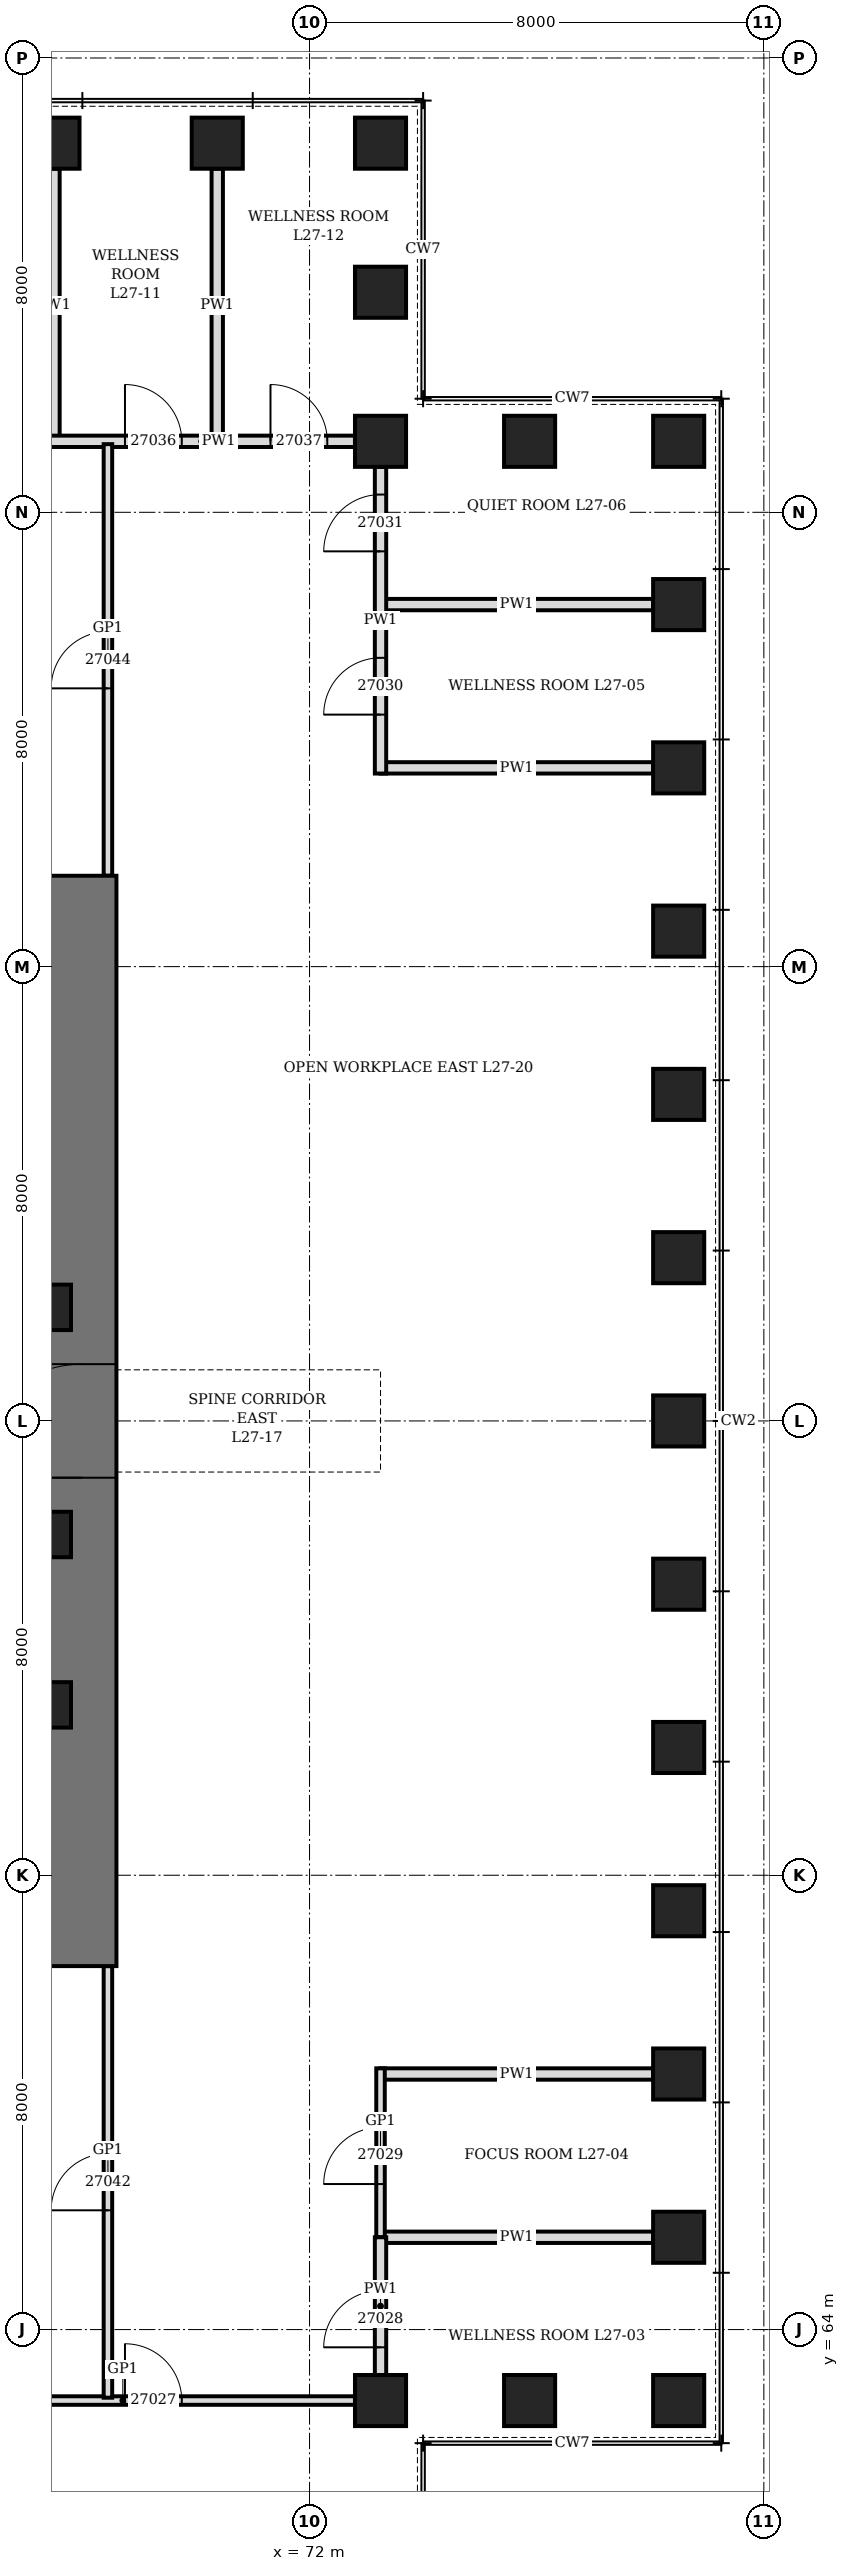
"""IFC4 building model, lengths in metres.
Left out: names, types, materials, properties, quantities, classifications, styles, units other than length and angle.
Written with IfcOpenShell. Run it as: python <this file> out.ifc"""

import sys

from ifc_helpers import new_model, si_unit, direction, frame, frame_2d, origin, origin_2d, place, context, subcontext, project, spatial, rectangle, hollow_rectangle, extrude, element, fill, save


model = new_model("IFC4")
c1 = context("Model", 3, precision=1e-05, world=origin(), true_north=direction((0.0, 1.0)))
c2 = subcontext(c1, "Body", "Model", "MODEL_VIEW")
j1 = project(units=[si_unit("LENGTHUNIT", "METRE"), si_unit("PLANEANGLEUNIT", "RADIAN")], contexts=[c1])
p1 = place(None, origin())
s1 = spatial("IfcSite", under=j1, at=p1, CompositionType="ELEMENT")
p2 = place(p1, origin())
s2 = spatial("IfcBuilding", under=s1, at=p2, CompositionType="ELEMENT")
p3 = place(p2, frame((0.0, 0.0, 124.9)))
s3 = spatial("IfcBuildingStorey", under=s2, at=p3, CompositionType="ELEMENT", Elevation=124.9)
for number, where, z_axis, x_axis in (
    (1, (73.25, 62.75, 0.0), (0.0, 0.0, 1.0), (1.0, 0.0, 0.0)),
    (2, (75.875, 62.75, 0.0), (0.0, 0.0, 1.0), (1.0, 0.0, 0.0)),
    (3, (78.5, 62.75, 0.0), (0.0, 0.0, 1.0), (0.0, 1.0, 0.0)),
    (4, (78.5, 65.625, 0.0), (0.0, 0.0, 1.0), (0.0, 1.0, 0.0)),
    (5, (78.5, 68.5, 0.0), (0.0, 0.0, 1.0), (0.0, 1.0, 0.0)),
    (6, (78.5, 71.375, 0.0), (0.0, 0.0, 1.0), (0.0, 1.0, 0.0)),
    (7, (78.5, 74.25, 0.0), (0.0, 0.0, 1.0), (0.0, 1.0, 0.0)),
    (8, (78.5, 77.125, 0.0), (0.0, 0.0, 1.0), (0.0, 1.0, 0.0)),
    (9, (78.5, 80.0, 0.0), (0.0, 0.0, 1.0), (0.0, 1.0, 0.0)),
    (10, (78.5, 82.875, 0.0), (0.0, 0.0, 1.0), (0.0, 1.0, 0.0)),
    (11, (78.5, 85.75, 0.0), (0.0, 0.0, 1.0), (0.0, 1.0, 0.0)),
    (12, (78.5, 88.625, 0.0), (0.0, 0.0, 1.0), (0.0, 1.0, 0.0)),
    (13, (78.5, 91.5, 0.0), (0.0, 0.0, 1.0), (0.0, 1.0, 0.0)),
    (14, (78.5, 94.375, 0.0), (0.0, 0.0, 1.0), (0.0, 1.0, 0.0)),
    (15, (78.5, 97.25, 0.0), (0.0, 0.0, 1.0), (1.0, 0.0, 0.0)),
    (16, (75.875, 97.25, 0.0), (0.0, 0.0, 1.0), (1.0, 0.0, 0.0)),
    (17, (73.25, 97.25, 0.0), (0.0, 0.0, 1.0), (0.0, 1.0, 0.0)),
    (18, (73.25, 99.875, 0.0), (0.0, 0.0, 1.0), (0.0, 1.0, 0.0)),
    (19, (73.25, 102.5, 0.0), (0.0, 0.0, 1.0), (1.0, 0.0, 0.0)),
    (20, (70.375, 102.5, 0.0), (0.0, 0.0, 1.0), (1.0, 0.0, 0.0)),
    (21, (67.5, 102.5, 0.0), (0.0, 0.0, 1.0), (1.0, 0.0, 0.0)),
):
    element("IfcColumn", number, at=place(p3, frame(where, z_axis=z_axis, x_axis=x_axis)), inside=s3, PredefinedType="COLUMN", context=c2, shape_type="SweptSolid", body=[
        extrude(hollow_rectangle(XDim=0.9, YDim=0.9, WallThickness=0.15, at=origin_2d()), origin(), (0.0, 0.0, 1.0), 4.2),
    ])
p4 = place(p3, frame((68.0, 70.4, 0.0), z_axis=(0.0, 0.0, 1.0), x_axis=(0.0, 1.0, 0.0)))
e22 = element("IfcWall", 22, at=p4, inside=s3, PredefinedType="SHEAR", context=c2, shape_type="SweptSolid", body=[
    extrude(rectangle(XDim=19.2, YDim=1.2, at=frame_2d((9.6, 0.0))), origin(), (0.0, 0.0, 1.0), 4.2),
])
p5 = place(p4, frame((8.6, 0.0, 0.0)))
e23 = element("IfcOpeningElement", 23, at=p5, cuts=e22, PredefinedType="OPENING", context=c2, shape_type="SweptSolid", body=[
    extrude(rectangle(XDim=2.0, YDim=2.4, at=frame_2d((1.0, 1.2))), frame((0.0, 0.61, 0.0), z_axis=(0.0, -1.0, 0.0), x_axis=(1.0, 0.0, 0.0)), (0.0, 0.0, 1.0), 1.22),
])
for number, where, z_axis, x_axis in (
    (24, (67.4, 75.0, 0.0), (0.0, 0.0, 1.0), (1.0, 0.0, 0.0)),
    (25, (67.4, 78.0, 0.0), (0.0, 0.0, 1.0), (1.0, 0.0, 0.0)),
    (26, (67.4, 82.0, 0.0), (0.0, 0.0, 1.0), (1.0, 0.0, 0.0)),
):
    element("IfcColumn", number, at=place(p3, frame(where, z_axis=z_axis, x_axis=x_axis)), inside=s3, PredefinedType="COLUMN", context=c2, shape_type="SweptSolid", body=[
        extrude(hollow_rectangle(XDim=0.8, YDim=0.8, WallThickness=0.1, at=origin_2d()), origin(), (0.0, 0.0, 1.0), 4.2),
    ])
for number, where, z_axis, x_axis in (
    (27, (73.25, 65.625, 0.0), (0.0, 0.0, 1.0), (1.0, 0.0, 0.0)),
    (28, (73.25, 68.5, 0.0), (0.0, 0.0, 1.0), (1.0, 0.0, 0.0)),
    (29, (73.25, 91.5, 0.0), (0.0, 0.0, 1.0), (1.0, 0.0, 0.0)),
    (30, (73.25, 94.375, 0.0), (0.0, 0.0, 1.0), (1.0, 0.0, 0.0)),
):
    element("IfcWall", number, at=place(p3, frame(where, z_axis=z_axis, x_axis=x_axis)), inside=s3, PredefinedType="PARTITIONING", context=c2, shape_type="SweptSolid", body=[
        extrude(rectangle(XDim=4.8, YDim=0.2, at=frame_2d((2.4, 0.0))), origin(), (0.0, 0.0, 1.0), 3.428),
    ])
p6 = place(p3, frame((67.5, 97.25, 0.0), z_axis=(0.0, 0.0, 1.0), x_axis=(0.0, 1.0, 0.0)))
e31 = element("IfcWall", 31, at=p6, inside=s3, PredefinedType="PARTITIONING", context=c2, shape_type="SweptSolid", body=[
    extrude(rectangle(XDim=4.8, YDim=0.2, at=frame_2d((2.4, 0.0))), origin(), (0.0, 0.0, 1.0), 2.74),
])
p7 = place(p3, frame((70.375, 97.25, 0.0), z_axis=(0.0, 0.0, 1.0), x_axis=(0.0, 1.0, 0.0)))
e32 = element("IfcWall", 32, at=p7, inside=s3, PredefinedType="PARTITIONING", context=c2, shape_type="SweptSolid", body=[
    extrude(rectangle(XDim=4.8, YDim=0.2, at=frame_2d((2.4, 0.0))), origin(), (0.0, 0.0, 1.0), 3.428),
])
p8 = place(p3, frame((64.625, 62.75, 0.0), z_axis=(0.0, 0.0, 1.0), x_axis=(1.0, 0.0, 0.0)))
e33 = element("IfcWall", 33, at=p8, inside=s3, PredefinedType="PARTITIONING", context=c2, shape_type="SweptSolid", body=[
    extrude(rectangle(XDim=8.175, YDim=0.15, at=frame_2d((4.087, 0.0))), origin(), (0.0, 0.0, 1.0), 4.04),
])
p9 = place(p8, frame((4.125, 0.0, 0.0)))
e34 = element("IfcOpeningElement", 34, at=p9, cuts=e33, PredefinedType="OPENING", context=c2, shape_type="SweptSolid", body=[
    extrude(rectangle(XDim=1.0, YDim=2.4, at=frame_2d((0.5, 1.2))), frame((0.0, 0.085, 0.0), z_axis=(0.0, -1.0, 0.0), x_axis=(1.0, 0.0, 0.0)), (0.0, 0.0, 1.0), 0.17),
])
p10 = place(p3, frame((67.4, 97.25, 0.0), z_axis=(0.0, 0.0, 1.0), x_axis=(1.0, 0.0, 0.0)))
e35 = element("IfcWall", 35, at=p10, inside=s3, PredefinedType="PARTITIONING", context=c2, shape_type="SweptSolid", body=[
    extrude(rectangle(XDim=5.4, YDim=0.2, at=frame_2d((2.7, 0.0))), origin(), (0.0, 0.0, 1.0), 4.04),
])
p11 = place(p10, frame((1.35, 0.0, 0.0)))
e36 = element("IfcOpeningElement", 36, at=p11, cuts=e35, PredefinedType="OPENING", context=c2, shape_type="SweptSolid", body=[
    extrude(rectangle(XDim=1.0, YDim=2.1, at=frame_2d((0.5, 1.05))), frame((0.0, 0.11, 0.0), z_axis=(0.0, -1.0, 0.0), x_axis=(1.0, 0.0, 0.0)), (0.0, 0.0, 1.0), 0.22),
])
p12 = place(p10, frame((3.913, 0.0, 0.0)))
e37 = element("IfcOpeningElement", 37, at=p12, cuts=e35, PredefinedType="OPENING", context=c2, shape_type="SweptSolid", body=[
    extrude(rectangle(XDim=1.0, YDim=2.1, at=frame_2d((0.5, 1.05))), frame((0.0, 0.11, 0.0), z_axis=(0.0, -1.0, 0.0), x_axis=(1.0, 0.0, 0.0)), (0.0, 0.0, 1.0), 0.22),
])
p13 = place(p3, frame((68.45, 62.8, 0.0), z_axis=(0.0, 0.0, 1.0), x_axis=(0.0, 1.0, 0.0)))
e38 = element("IfcWall", 38, at=p13, inside=s3, PredefinedType="PARTITIONING", context=c2, shape_type="SweptSolid", body=[
    extrude(rectangle(XDim=7.6, YDim=0.15, at=frame_2d((3.8, 0.0))), origin(), (0.0, 0.0, 1.0), 4.04),
])
p14 = place(p13, frame((3.3, 0.0, 0.0)))
e39 = element("IfcOpeningElement", 39, at=p14, cuts=e38, PredefinedType="OPENING", context=c2, shape_type="SweptSolid", body=[
    extrude(rectangle(XDim=1.0, YDim=2.4, at=frame_2d((0.5, 1.2))), frame((0.0, 0.085, 0.0), z_axis=(0.0, -1.0, 0.0), x_axis=(1.0, 0.0, 0.0)), (0.0, 0.0, 1.0), 0.17),
])
p15 = place(p3, frame((68.45, 89.6, 0.0), z_axis=(0.0, 0.0, 1.0), x_axis=(0.0, 1.0, 0.0)))
e40 = element("IfcWall", 40, at=p15, inside=s3, PredefinedType="PARTITIONING", context=c2, shape_type="SweptSolid", body=[
    extrude(rectangle(XDim=7.6, YDim=0.15, at=frame_2d((3.8, 0.0))), origin(), (0.0, 0.0, 1.0), 4.04),
])
p16 = place(p15, frame((3.3, 0.0, 0.0)))
e41 = element("IfcOpeningElement", 41, at=p16, cuts=e40, PredefinedType="OPENING", context=c2, shape_type="SweptSolid", body=[
    extrude(rectangle(XDim=1.0, YDim=2.4, at=frame_2d((0.5, 1.2))), frame((0.0, 0.085, 0.0), z_axis=(0.0, -1.0, 0.0), x_axis=(1.0, 0.0, 0.0)), (0.0, 0.0, 1.0), 0.17),
])
p17 = place(p3, frame((73.25, 65.625, 0.0), z_axis=(0.0, 0.0, 1.0), x_axis=(0.0, 1.0, 0.0)))
e42 = element("IfcWall", 42, at=p17, inside=s3, PredefinedType="PARTITIONING", context=c2, shape_type="SweptSolid", body=[
    extrude(rectangle(XDim=2.975, YDim=0.15, at=frame_2d((1.488, 0.0))), origin(), (0.0, 0.0, 1.0), 4.04),
])
p18 = place(p17, frame((0.938, 0.0, 0.0)))
e43 = element("IfcOpeningElement", 43, at=p18, cuts=e42, PredefinedType="OPENING", context=c2, shape_type="SweptSolid", body=[
    extrude(rectangle(XDim=1.0, YDim=2.4, at=frame_2d((0.5, 1.2))), frame((0.0, 0.085, 0.0), z_axis=(0.0, -1.0, 0.0), x_axis=(1.0, 0.0, 0.0)), (0.0, 0.0, 1.0), 0.17),
])
p19 = place(p3, frame((73.25, 63.2, 0.0), z_axis=(0.0, 0.0, 1.0), x_axis=(0.0, 1.0, 0.0)))
e44 = element("IfcWall", 44, at=p19, inside=s3, PredefinedType="PARTITIONING", context=c2, shape_type="SweptSolid", body=[
    extrude(rectangle(XDim=2.425, YDim=0.2, at=frame_2d((1.212, 0.0))), origin(), (0.0, 0.0, 1.0), 4.04),
])
p20 = place(p19, frame((0.488, 0.0, 0.0)))
e45 = element("IfcOpeningElement", 45, at=p20, cuts=e44, PredefinedType="OPENING", context=c2, shape_type="SweptSolid", body=[
    extrude(rectangle(XDim=1.0, YDim=2.1, at=frame_2d((0.5, 1.05))), frame((0.0, 0.11, 0.0), z_axis=(0.0, -1.0, 0.0), x_axis=(1.0, 0.0, 0.0)), (0.0, 0.0, 1.0), 0.22),
])
p21 = place(p3, frame((73.25, 91.4, 0.0), z_axis=(0.0, 0.0, 1.0), x_axis=(0.0, 1.0, 0.0)))
e46 = element("IfcWall", 46, at=p21, inside=s3, PredefinedType="PARTITIONING", context=c2, shape_type="SweptSolid", body=[
    extrude(rectangle(XDim=5.4, YDim=0.2, at=frame_2d((2.7, 0.0))), origin(), (0.0, 0.0, 1.0), 4.04),
])
p22 = place(p21, frame((1.038, 0.0, 0.0)))
e47 = element("IfcOpeningElement", 47, at=p22, cuts=e46, PredefinedType="OPENING", context=c2, shape_type="SweptSolid", body=[
    extrude(rectangle(XDim=1.0, YDim=2.1, at=frame_2d((0.5, 1.05))), frame((0.0, 0.11, 0.0), z_axis=(0.0, -1.0, 0.0), x_axis=(1.0, 0.0, 0.0)), (0.0, 0.0, 1.0), 0.22),
])
p23 = place(p21, frame((3.913, 0.0, 0.0)))
e48 = element("IfcOpeningElement", 48, at=p23, cuts=e46, PredefinedType="OPENING", context=c2, shape_type="SweptSolid", body=[
    extrude(rectangle(XDim=1.0, YDim=2.1, at=frame_2d((0.5, 1.05))), frame((0.0, 0.11, 0.0), z_axis=(0.0, -1.0, 0.0), x_axis=(1.0, 0.0, 0.0)), (0.0, 0.0, 1.0), 0.22),
])
p24 = place(p5, origin())
e49 = element("IfcDoor", 49, at=p24, inside=s3, OperationType="DOUBLE_DOOR_SINGLE_SWING", PredefinedType="DOOR", context=c2, shape_type="SweptSolid", body=[
    extrude(rectangle(XDim=2.0, YDim=2.4, at=frame_2d((1.0, 1.2))), frame((0.0, 0.35, 0.0), z_axis=(0.0, -1.0, 0.0), x_axis=(1.0, 0.0, 0.0)), (0.0, 0.0, 1.0), 0.7),
])
fill(e23, e49)
p25 = place(p9, origin())
e50 = element("IfcDoor", 50, at=p25, inside=s3, OperationType="SINGLE_SWING_RIGHT", PredefinedType="DOOR", context=c2, shape_type="SweptSolid", body=[
    extrude(rectangle(XDim=1.0, YDim=2.4, at=frame_2d((0.5, 1.2))), frame((0.0, 0.075, 0.0), z_axis=(0.0, -1.0, 0.0), x_axis=(1.0, 0.0, 0.0)), (0.0, 0.0, 1.0), 0.149),
])
fill(e34, e50)
p26 = place(p20, origin())
e51 = element("IfcDoor", 51, at=p26, inside=s3, OperationType="SINGLE_SWING_LEFT", PredefinedType="DOOR", context=c2, shape_type="SweptSolid", body=[
    extrude(rectangle(XDim=1.0, YDim=2.1, at=frame_2d((0.5, 1.05))), frame((0.0, 0.1, 0.0), z_axis=(0.0, -1.0, 0.0), x_axis=(1.0, 0.0, 0.0)), (0.0, 0.0, 1.0), 0.199),
])
fill(e45, e51)
p27 = place(p18, origin())
e52 = element("IfcDoor", 52, at=p27, inside=s3, OperationType="SINGLE_SWING_RIGHT", PredefinedType="DOOR", context=c2, shape_type="SweptSolid", body=[
    extrude(rectangle(XDim=1.0, YDim=2.4, at=frame_2d((0.5, 1.2))), frame((0.0, 0.075, 0.0), z_axis=(0.0, -1.0, 0.0), x_axis=(1.0, 0.0, 0.0)), (0.0, 0.0, 1.0), 0.149),
])
fill(e43, e52)
p28 = place(p22, origin())
e53 = element("IfcDoor", 53, at=p28, inside=s3, OperationType="SINGLE_SWING_LEFT", PredefinedType="DOOR", context=c2, shape_type="SweptSolid", body=[
    extrude(rectangle(XDim=1.0, YDim=2.1, at=frame_2d((0.5, 1.05))), frame((0.0, 0.1, 0.0), z_axis=(0.0, -1.0, 0.0), x_axis=(1.0, 0.0, 0.0)), (0.0, 0.0, 1.0), 0.199),
])
fill(e47, e53)
p29 = place(p23, origin())
e54 = element("IfcDoor", 54, at=p29, inside=s3, OperationType="SINGLE_SWING_LEFT", PredefinedType="DOOR", context=c2, shape_type="SweptSolid", body=[
    extrude(rectangle(XDim=1.0, YDim=2.1, at=frame_2d((0.5, 1.05))), frame((0.0, 0.1, 0.0), z_axis=(0.0, -1.0, 0.0), x_axis=(1.0, 0.0, 0.0)), (0.0, 0.0, 1.0), 0.199),
])
fill(e48, e54)
p30 = place(p11, origin())
e55 = element("IfcDoor", 55, at=p30, inside=s3, OperationType="SINGLE_SWING_LEFT", PredefinedType="DOOR", context=c2, shape_type="SweptSolid", body=[
    extrude(rectangle(XDim=1.0, YDim=2.1, at=frame_2d((0.5, 1.05))), frame((0.0, 0.1, 0.0), z_axis=(0.0, -1.0, 0.0), x_axis=(1.0, 0.0, 0.0)), (0.0, 0.0, 1.0), 0.199),
])
fill(e36, e55)
p31 = place(p12, origin())
e56 = element("IfcDoor", 56, at=p31, inside=s3, OperationType="SINGLE_SWING_LEFT", PredefinedType="DOOR", context=c2, shape_type="SweptSolid", body=[
    extrude(rectangle(XDim=1.0, YDim=2.1, at=frame_2d((0.5, 1.05))), frame((0.0, 0.1, 0.0), z_axis=(0.0, -1.0, 0.0), x_axis=(1.0, 0.0, 0.0)), (0.0, 0.0, 1.0), 0.199),
])
fill(e37, e56)
p32 = place(p14, origin())
e57 = element("IfcDoor", 57, at=p32, inside=s3, OperationType="SINGLE_SWING_RIGHT", PredefinedType="DOOR", context=c2, shape_type="SweptSolid", body=[
    extrude(rectangle(XDim=1.0, YDim=2.4, at=frame_2d((0.5, 1.2))), frame((0.0, 0.075, 0.0), z_axis=(0.0, -1.0, 0.0), x_axis=(1.0, 0.0, 0.0)), (0.0, 0.0, 1.0), 0.149),
])
fill(e39, e57)
p33 = place(p16, origin())
e58 = element("IfcDoor", 58, at=p33, inside=s3, OperationType="SINGLE_SWING_RIGHT", PredefinedType="DOOR", context=c2, shape_type="SweptSolid", body=[
    extrude(rectangle(XDim=1.0, YDim=2.4, at=frame_2d((0.5, 1.2))), frame((0.0, 0.075, 0.0), z_axis=(0.0, -1.0, 0.0), x_axis=(1.0, 0.0, 0.0)), (0.0, 0.0, 1.0), 0.149),
])
fill(e41, e58)
save(model, sys.argv[1])
